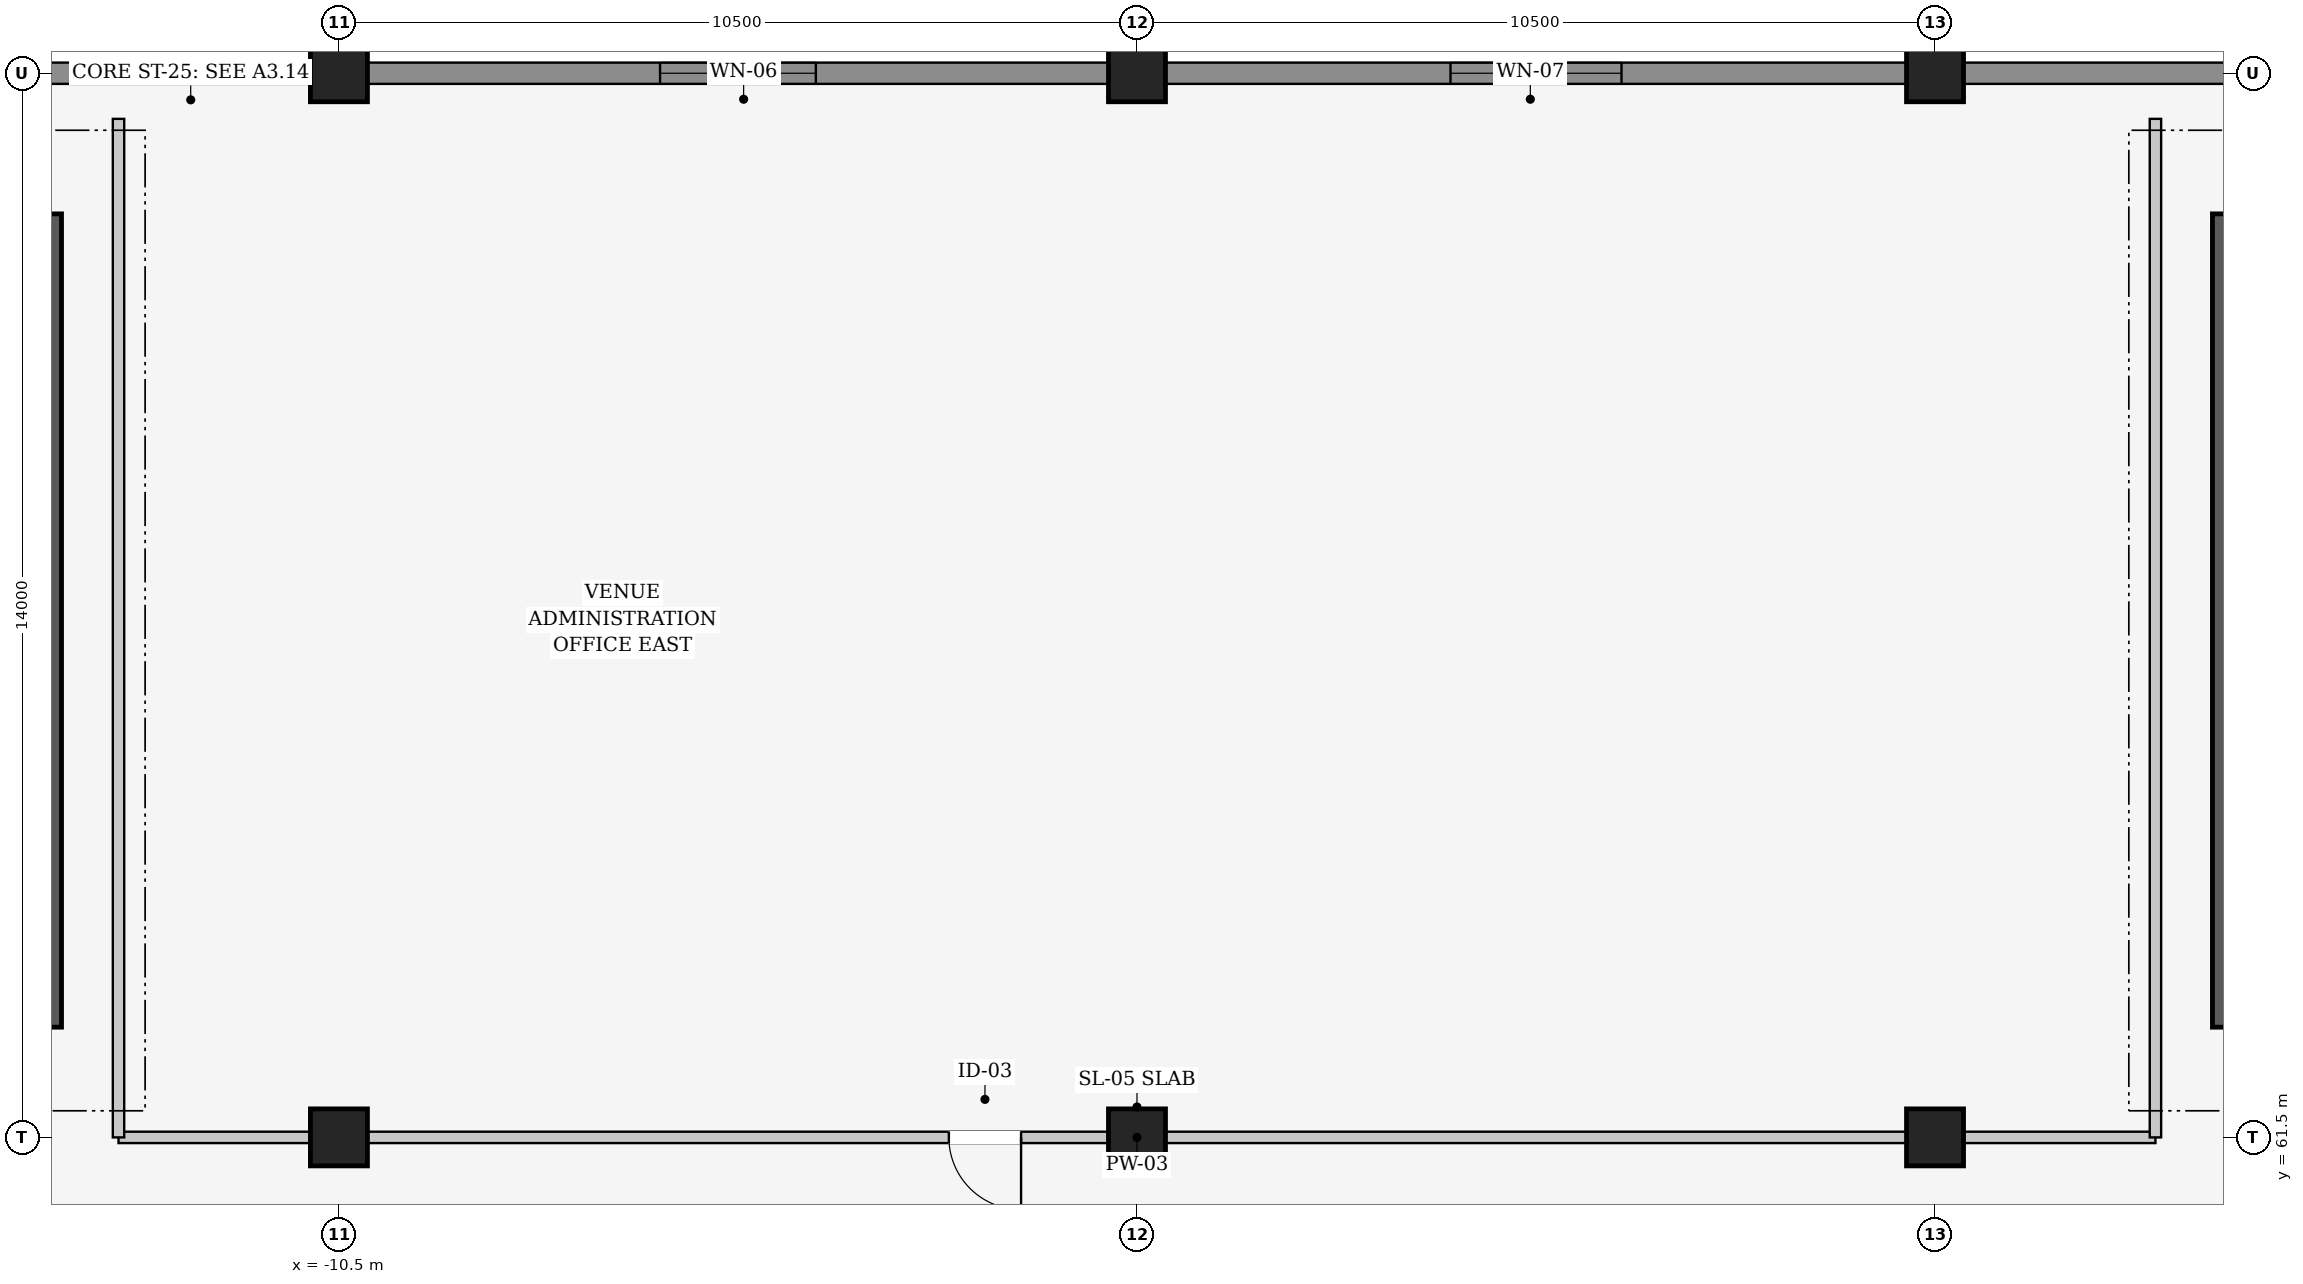
"""IFC4 building model, lengths in metres.
Left out: names, types, materials, properties, quantities, classifications, styles, units other than length and angle.
Written with IfcOpenShell. Run it as: python <this file> out.ifc"""

import sys

from ifc_helpers import new_model, si_unit, direction, frame, frame_2d, origin, origin_2d, place, context, subcontext, project, spatial, rectangle, extrude, element, fill, save


model = new_model("IFC4")
c1 = context("Model", 3, precision=1e-05, world=origin(), true_north=direction((0.0, 1.0)))
c2 = subcontext(c1, "Body", "Model", "MODEL_VIEW")
j1 = project(units=[si_unit("LENGTHUNIT", "METRE"), si_unit("PLANEANGLEUNIT", "RADIAN")], contexts=[c1])
p1 = place(None, origin())
s1 = spatial("IfcSite", under=j1, at=p1, CompositionType="ELEMENT")
p2 = place(p1, origin())
s2 = spatial("IfcBuilding", under=s1, at=p2, CompositionType="ELEMENT")
p3 = place(p2, frame((0.0, 0.0, 11.4)))
s3 = spatial("IfcBuildingStorey", under=s2, at=p3, CompositionType="ELEMENT", Elevation=11.4)
for number, where, z_axis, x_axis in (
    (1, (-10.5, 61.5, 0.0), (0.0, 0.0, 1.0), (1.0, 0.0, 0.0)),
    (2, (-10.5, 75.5, 0.0), (0.0, 0.0, 1.0), (1.0, 0.0, 0.0)),
    (3, (0.0, 61.5, 0.0), (0.0, 0.0, 1.0), (1.0, 0.0, 0.0)),
    (4, (0.0, 75.5, 0.0), (0.0, 0.0, 1.0), (1.0, 0.0, 0.0)),
    (5, (10.5, 61.5, 0.0), (0.0, 0.0, 1.0), (1.0, 0.0, 0.0)),
    (6, (10.5, 75.5, 0.0), (0.0, 0.0, 1.0), (1.0, 0.0, 0.0)),
):
    element("IfcColumn", number, at=place(p3, frame(where, z_axis=z_axis, x_axis=x_axis)), inside=s3, PredefinedType="COLUMN", context=c2, shape_type="SweptSolid", body=[
        extrude(rectangle(XDim=0.75, YDim=0.75, at=origin_2d()), origin(), (0.0, 0.0, 1.0), 4.8),
    ])
p4 = place(p3, frame((-20.643, 75.5, 0.0), z_axis=(0.0, 0.0, 1.0), x_axis=(1.0, 0.0, 0.0)))
e7 = element("IfcWall", 7, at=p4, inside=s3, PredefinedType="SOLIDWALL", context=c2, shape_type="SweptSolid", body=[
    extrude(rectangle(XDim=9.786, YDim=0.28, at=frame_2d((4.893, 0.0))), origin(), (0.0, 0.0, 1.0), 3.62),
])
p5 = place(p4, frame((3.968, 0.0, 0.95)))
e8 = element("IfcOpeningElement", 8, at=p5, cuts=e7, PredefinedType="OPENING", context=c2, shape_type="SweptSolid", body=[
    extrude(rectangle(XDim=1.85, YDim=1.25, at=frame_2d((0.925, 0.625))), frame((0.0, 0.15, 0.0), z_axis=(0.0, -1.0, 0.0), x_axis=(1.0, 0.0, 0.0)), (0.0, 0.0, 1.0), 0.3),
])
p6 = place(p3, frame((-10.143, 75.5, 0.0), z_axis=(0.0, 0.0, 1.0), x_axis=(1.0, 0.0, 0.0)))
e9 = element("IfcWall", 9, at=p6, inside=s3, PredefinedType="SOLIDWALL", context=c2, shape_type="SweptSolid", body=[
    extrude(rectangle(XDim=9.786, YDim=0.28, at=frame_2d((4.893, 0.0))), origin(), (0.0, 0.0, 1.0), 3.62),
])
p7 = place(p6, frame((3.868, 0.0, 0.95)))
e10 = element("IfcOpeningElement", 10, at=p7, cuts=e9, PredefinedType="OPENING", context=c2, shape_type="SweptSolid", body=[
    extrude(rectangle(XDim=2.05, YDim=1.25, at=frame_2d((1.025, 0.625))), frame((0.0, 0.15, 0.0), z_axis=(0.0, -1.0, 0.0), x_axis=(1.0, 0.0, 0.0)), (0.0, 0.0, 1.0), 0.3),
])
p8 = place(p3, frame((0.357, 75.5, 0.0), z_axis=(0.0, 0.0, 1.0), x_axis=(1.0, 0.0, 0.0)))
e11 = element("IfcWall", 11, at=p8, inside=s3, PredefinedType="SOLIDWALL", context=c2, shape_type="SweptSolid", body=[
    extrude(rectangle(XDim=9.786, YDim=0.28, at=frame_2d((4.893, 0.0))), origin(), (0.0, 0.0, 1.0), 3.62),
])
p9 = place(p8, frame((3.768, 0.0, 0.95)))
e12 = element("IfcOpeningElement", 12, at=p9, cuts=e11, PredefinedType="OPENING", context=c2, shape_type="SweptSolid", body=[
    extrude(rectangle(XDim=2.25, YDim=1.25, at=frame_2d((1.125, 0.625))), frame((0.0, 0.15, 0.0), z_axis=(0.0, -1.0, 0.0), x_axis=(1.0, 0.0, 0.0)), (0.0, 0.0, 1.0), 0.3),
])
p10 = place(p3, frame((10.857, 75.5, 0.0), z_axis=(0.0, 0.0, 1.0), x_axis=(1.0, 0.0, 0.0)))
e13 = element("IfcWall", 13, at=p10, inside=s3, PredefinedType="SOLIDWALL", context=c2, shape_type="SweptSolid", body=[
    extrude(rectangle(XDim=9.786, YDim=0.28, at=frame_2d((4.893, 0.0))), origin(), (0.0, 0.0, 1.0), 3.62),
])
p11 = place(p10, frame((3.643, 0.0, 0.95)))
e14 = element("IfcOpeningElement", 14, at=p11, cuts=e13, PredefinedType="OPENING", context=c2, shape_type="SweptSolid", body=[
    extrude(rectangle(XDim=2.5, YDim=1.25, at=frame_2d((1.25, 0.625))), frame((0.0, 0.15, 0.0), z_axis=(0.0, -1.0, 0.0), x_axis=(1.0, 0.0, 0.0)), (0.0, 0.0, 1.0), 0.3),
])
for number, where, z_axis, x_axis in (
    (15, (-14.275, 73.65, 0.0), (0.0, 0.0, 1.0), (0.0, -1.0, 0.0)),
    (16, (14.275, 62.95, 0.0), (0.0, 0.0, 1.0), (0.0, 1.0, 0.0)),
):
    element("IfcWall", number, at=place(p3, frame(where, z_axis=z_axis, x_axis=x_axis)), inside=s3, PredefinedType="SHEAR", context=c2, shape_type="SweptSolid", body=[
        extrude(rectangle(XDim=10.7, YDim=0.25, at=frame_2d((5.35, 0.0))), origin(), (0.0, 0.0, 1.0), 4.8),
    ])
p12 = place(p3, frame((13.4, 61.5, 0.0), z_axis=(0.0, 0.0, 1.0), x_axis=(-1.0, 0.0, 0.0)))
e17 = element("IfcWall", 17, at=p12, inside=s3, PredefinedType="PARTITIONING", context=c2, shape_type="SweptSolid", body=[
    extrude(rectangle(XDim=26.8, YDim=0.15, at=frame_2d((13.4, 0.0))), origin(), (0.0, 0.0, 1.0), 3.605),
])
p13 = place(p12, frame((14.925, 0.0, 0.0)))
e18 = element("IfcOpeningElement", 18, at=p13, cuts=e17, PredefinedType="OPENING", context=c2, shape_type="SweptSolid", body=[
    extrude(rectangle(XDim=0.95, YDim=2.15, at=frame_2d((0.475, 1.075))), frame((0.0, 0.085, 0.0), z_axis=(0.0, -1.0, 0.0), x_axis=(1.0, 0.0, 0.0)), (0.0, 0.0, 1.0), 0.17),
])
for number, where, z_axis, x_axis in (
    (19, (13.4, 74.9, 0.0), (0.0, 0.0, 1.0), (0.0, -1.0, 0.0)),
    (20, (-13.4, 61.5, 0.0), (0.0, 0.0, 1.0), (0.0, 1.0, 0.0)),
):
    element("IfcWall", number, at=place(p3, frame(where, z_axis=z_axis, x_axis=x_axis)), inside=s3, PredefinedType="PARTITIONING", context=c2, shape_type="SweptSolid", body=[
        extrude(rectangle(XDim=13.4, YDim=0.15, at=frame_2d((6.7, 0.0))), origin(), (0.0, 0.0, 1.0), 3.605),
    ])
p14 = place(p7, origin())
e21 = element("IfcWindow", 21, at=p14, inside=s3, PartitioningType="SINGLE_PANEL", PredefinedType="WINDOW", context=c2, shape_type="SweptSolid", body=[
    extrude(rectangle(XDim=2.05, YDim=1.25, at=frame_2d((1.025, 0.625))), frame((0.0, 0.03, 0.0), z_axis=(0.0, -1.0, 0.0), x_axis=(1.0, 0.0, 0.0)), (0.0, 0.0, 1.0), 0.06),
])
fill(e10, e21)
p15 = place(p9, origin())
e22 = element("IfcWindow", 22, at=p15, inside=s3, PartitioningType="SINGLE_PANEL", PredefinedType="WINDOW", context=c2, shape_type="SweptSolid", body=[
    extrude(rectangle(XDim=2.25, YDim=1.25, at=frame_2d((1.125, 0.625))), frame((0.0, 0.03, 0.0), z_axis=(0.0, -1.0, 0.0), x_axis=(1.0, 0.0, 0.0)), (0.0, 0.0, 1.0), 0.06),
])
fill(e12, e22)
p16 = place(p13, origin())
e23 = element("IfcDoor", 23, at=p16, inside=s3, OperationType="SINGLE_SWING_LEFT", PredefinedType="DOOR", context=c2, shape_type="SweptSolid", body=[
    extrude(rectangle(XDim=0.95, YDim=2.15, at=frame_2d((0.475, 1.075))), frame((0.0, 0.025, 0.0), z_axis=(0.0, -1.0, 0.0), x_axis=(1.0, 0.0, 0.0)), (0.0, 0.0, 1.0), 0.05),
])
fill(e18, e23)
save(model, sys.argv[1])
